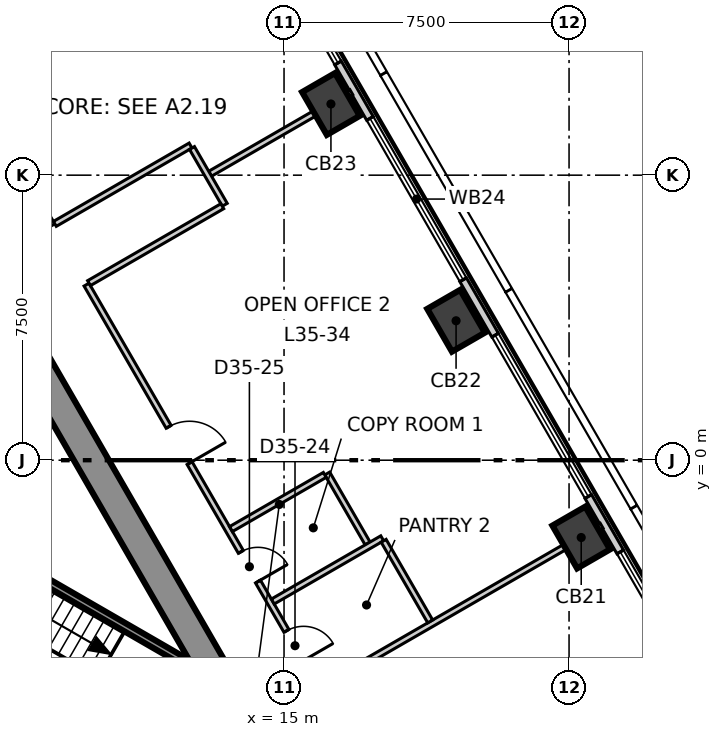
"""IFC4 building model, lengths in metres.
Left out: names, types, materials, properties, quantities, classifications, styles, units other than length and angle.
Written with IfcOpenShell. Run it as: python <this file> out.ifc"""

import sys

from ifc_helpers import new_model, si_unit, direction, frame, frame_2d, origin, origin_2d, place, context, subcontext, project, spatial, polyline, rectangle, outline, extrude, element, fill, save


model = new_model("IFC4")
c1 = context("Model", 3, precision=1e-05, world=origin(), true_north=direction((0.0, 1.0)))
c2 = subcontext(c1, "Body", "Model", "MODEL_VIEW")
j1 = project(units=[si_unit("LENGTHUNIT", "METRE"), si_unit("PLANEANGLEUNIT", "RADIAN")], contexts=[c1])
p1 = place(None, origin())
s1 = spatial("IfcSite", under=j1, at=p1, CompositionType="ELEMENT")
p2 = place(p1, origin())
s2 = spatial("IfcBuilding", under=s1, at=p2, CompositionType="ELEMENT")
p3 = place(p2, frame((0.0, 0.0, 152.3)))
s3 = spatial("IfcBuildingStorey", under=s2, at=p3, CompositionType="ELEMENT", Elevation=152.3)
p4 = place(p3, frame((13.221, -5.7, -0.3), z_axis=(0.0, 0.0, 1.0), x_axis=(-0.499995765644, 0.866027848477, 0.0)))
e1 = element("IfcWall", 1, at=p4, inside=s3, PredefinedType="SHEAR", context=c2, shape_type="SweptSolid", body=[
    extrude(outline(polyline([(-0.231, -0.4), (1.732, -0.4), (3.695, -0.4), (5.658, -0.4), (7.621, -0.4), (9.584, -0.4), (11.547, -0.4), (13.51, -0.4), (15.473, -0.4), (17.436, -0.4), (19.399, -0.4), (21.362, -0.4), (23.325, -0.4), (22.863, 0.4), (20.977, 0.4), (19.091, 0.4), (17.205, 0.4), (15.319, 0.4), (13.433, 0.4), (11.547, 0.4), (9.661, 0.4), (7.775, 0.4), (5.889, 0.4), (4.003, 0.4), (2.117, 0.4), (0.231, 0.4), (-0.231, -0.4)])), origin(), (0.0, 0.0, 1.0), 4.0),
])
p5 = place(p4, frame((10.647, 0.0, 0.3)))
e2 = element("IfcOpeningElement", 2, at=p5, cuts=e1, PredefinedType="OPENING", context=c2, shape_type="SweptSolid", body=[
    extrude(rectangle(XDim=1.8, YDim=2.1, at=frame_2d((0.9, 1.05))), frame((0.0, 0.41, 0.0), z_axis=(0.0, -1.0, 0.0), x_axis=(1.0, 0.0, 0.0)), (0.0, 0.0, 1.0), 0.82),
])
for number, where, z_axis, x_axis in (
    (3, (22.82, -2.034, -0.3), (0.0, 0.0, 1.0), (-0.5, 0.866, 0.0)),
    (4, (19.527, 3.669, -0.3), (0.0, 0.0, 1.0), (-0.5, 0.866, 0.0)),
    (5, (16.234, 9.373, -0.3), (0.0, 0.0, 1.0), (-0.5, 0.866, 0.0)),
):
    element("IfcColumn", number, at=place(p3, frame(where, z_axis=z_axis, x_axis=x_axis)), inside=s3, PredefinedType="COLUMN", context=c2, shape_type="SweptSolid", body=[
        extrude(rectangle(XDim=1.3, YDim=1.0, at=origin_2d()), origin(), (0.0, 0.0, 1.0), 4.0),
    ])
p6 = place(p3, frame((30.664, -14.22, 0.0), z_axis=(0.0, 0.0, 1.0), x_axis=(-0.499984613623, 0.866034286931, 0.0)))
e6 = element("IfcWall", 6, at=p6, inside=s3, PredefinedType="ELEMENTEDWALL", context=c2, shape_type="SweptSolid", body=[
    extrude(rectangle(XDim=55.274, YDim=0.2, at=frame_2d((27.637, 0.0))), origin(), (0.0, 0.0, 1.0), 3.7),
])
p7 = place(p6, frame((2.146, 0.0, 0.9)))
e7 = element("IfcOpeningElement", 7, at=p7, cuts=e6, PredefinedType="OPENING", context=c2, shape_type="SweptSolid", body=[
    extrude(rectangle(XDim=4.9, YDim=2.5, at=frame_2d((2.45, 1.25))), frame((0.0, 0.11, 0.0), z_axis=(0.0, -1.0, 0.0), x_axis=(1.0, 0.0, 0.0)), (0.0, 0.0, 1.0), 0.22),
])
p8 = place(p6, frame((8.732, 0.0, 0.9)))
e8 = element("IfcOpeningElement", 8, at=p8, cuts=e6, PredefinedType="OPENING", context=c2, shape_type="SweptSolid", body=[
    extrude(rectangle(XDim=4.9, YDim=2.5, at=frame_2d((2.45, 1.25))), frame((0.0, 0.11, 0.0), z_axis=(0.0, -1.0, 0.0), x_axis=(1.0, 0.0, 0.0)), (0.0, 0.0, 1.0), 0.22),
])
p9 = place(p6, frame((15.318, 0.0, 0.9)))
e9 = element("IfcOpeningElement", 9, at=p9, cuts=e6, PredefinedType="OPENING", context=c2, shape_type="SweptSolid", body=[
    extrude(rectangle(XDim=4.9, YDim=2.5, at=frame_2d((2.45, 1.25))), frame((0.0, 0.11, 0.0), z_axis=(0.0, -1.0, 0.0), x_axis=(1.0, 0.0, 0.0)), (0.0, 0.0, 1.0), 0.22),
])
p10 = place(p6, frame((21.904, 0.0, 0.9)))
e10 = element("IfcOpeningElement", 10, at=p10, cuts=e6, PredefinedType="OPENING", context=c2, shape_type="SweptSolid", body=[
    extrude(rectangle(XDim=4.9, YDim=2.5, at=frame_2d((2.45, 1.25))), frame((0.0, 0.11, 0.0), z_axis=(0.0, -1.0, 0.0), x_axis=(1.0, 0.0, 0.0)), (0.0, 0.0, 1.0), 0.22),
])
p11 = place(p6, frame((28.49, 0.0, 0.9)))
e11 = element("IfcOpeningElement", 11, at=p11, cuts=e6, PredefinedType="OPENING", context=c2, shape_type="SweptSolid", body=[
    extrude(rectangle(XDim=4.9, YDim=2.5, at=frame_2d((2.45, 1.25))), frame((0.0, 0.11, 0.0), z_axis=(0.0, -1.0, 0.0), x_axis=(1.0, 0.0, 0.0)), (0.0, 0.0, 1.0), 0.22),
])
p12 = place(p6, frame((35.076, 0.0, 0.9)))
e12 = element("IfcOpeningElement", 12, at=p12, cuts=e6, PredefinedType="OPENING", context=c2, shape_type="SweptSolid", body=[
    extrude(rectangle(XDim=4.9, YDim=2.5, at=frame_2d((2.45, 1.25))), frame((0.0, 0.11, 0.0), z_axis=(0.0, -1.0, 0.0), x_axis=(1.0, 0.0, 0.0)), (0.0, 0.0, 1.0), 0.22),
])
p13 = place(p6, frame((41.662, 0.0, 0.9)))
e13 = element("IfcOpeningElement", 13, at=p13, cuts=e6, PredefinedType="OPENING", context=c2, shape_type="SweptSolid", body=[
    extrude(rectangle(XDim=4.9, YDim=2.5, at=frame_2d((2.45, 1.25))), frame((0.0, 0.11, 0.0), z_axis=(0.0, -1.0, 0.0), x_axis=(1.0, 0.0, 0.0)), (0.0, 0.0, 1.0), 0.22),
])
p14 = place(p6, frame((48.248, 0.0, 0.9)))
e14 = element("IfcOpeningElement", 14, at=p14, cuts=e6, PredefinedType="OPENING", context=c2, shape_type="SweptSolid", body=[
    extrude(rectangle(XDim=4.9, YDim=2.5, at=frame_2d((2.45, 1.25))), frame((0.0, 0.11, 0.0), z_axis=(0.0, -1.0, 0.0), x_axis=(1.0, 0.0, 0.0)), (0.0, 0.0, 1.0), 0.22),
])
p15 = place(p3, frame((13.055, 7.538, 0.0), z_axis=(0.0, 0.0, 1.0), x_axis=(0.866070942811, 0.499921115796, 0.0)))
e15 = element("IfcWall", 15, at=p15, inside=s3, PredefinedType="PARTITIONING", context=c2, shape_type="SweptSolid", body=[
    extrude(rectangle(XDim=4.291, YDim=0.15, at=frame_2d((2.146, 0.0))), origin(), (0.0, 0.0, 1.0), 3.2),
])
p16 = place(p3, frame((0.076, 21.468, 0.0), z_axis=(0.0, 0.0, 1.0), x_axis=(0.500006592492, -0.866021597574, 0.0)))
e16 = element("IfcWall", 16, at=p16, inside=s3, PredefinedType="PARTITIONING", context=c2, shape_type="SweptSolid", body=[
    extrude(rectangle(XDim=17.652, YDim=0.15, at=frame_2d((8.826, 0.0))), origin(), (0.0, 0.0, 1.0), 3.7),
])
p17 = place(p16, frame((8.204, 0.0, 0.0)))
e17 = element("IfcOpeningElement", 17, at=p17, cuts=e16, PredefinedType="OPENING", context=c2, shape_type="SweptSolid", body=[
    extrude(rectangle(XDim=1.1, YDim=2.1, at=frame_2d((0.55, 1.05))), frame((0.0, 0.085, 0.0), z_axis=(0.0, -1.0, 0.0), x_axis=(1.0, 0.0, 0.0)), (0.0, 0.0, 1.0), 0.17),
])
p18 = place(p3, frame((9.803, 4.62, 0.0), z_axis=(0.0, 0.0, 1.0), x_axis=(0.500017706633, -0.866015180614, 0.0)))
e18 = element("IfcWall", 18, at=p18, inside=s3, PredefinedType="PARTITIONING", context=c2, shape_type="SweptSolid", body=[
    extrude(rectangle(XDim=17.656, YDim=0.15, at=frame_2d((8.828, 0.0))), origin(), (0.0, 0.0, 1.0), 3.7),
])
p19 = place(p18, frame((14.456, 0.0, 0.0)))
e19 = element("IfcOpeningElement", 19, at=p19, cuts=e18, PredefinedType="OPENING", context=c2, shape_type="SweptSolid", body=[
    extrude(rectangle(XDim=1.1, YDim=2.1, at=frame_2d((0.55, 1.05))), frame((0.0, 0.085, 0.0), z_axis=(0.0, -1.0, 0.0), x_axis=(1.0, 0.0, 0.0)), (0.0, 0.0, 1.0), 0.17),
])
p20 = place(p18, frame((4.321, 0.0, 0.0)))
e20 = element("IfcOpeningElement", 20, at=p20, cuts=e18, PredefinedType="OPENING", context=c2, shape_type="SweptSolid", body=[
    extrude(rectangle(XDim=1.1, YDim=2.1, at=frame_2d((0.55, 1.05))), frame((0.0, 0.085, 0.0), z_axis=(0.0, -1.0, 0.0), x_axis=(1.0, 0.0, 0.0)), (0.0, 0.0, 1.0), 0.17),
])
p21 = place(p18, frame((10.521, 0.0, 0.0)))
e21 = element("IfcOpeningElement", 21, at=p21, cuts=e18, PredefinedType="OPENING", context=c2, shape_type="SweptSolid", body=[
    extrude(rectangle(XDim=0.9, YDim=2.1, at=frame_2d((0.45, 1.05))), frame((0.0, 0.085, 0.0), z_axis=(0.0, -1.0, 0.0), x_axis=(1.0, 0.0, 0.0)), (0.0, 0.0, 1.0), 0.17),
])
p22 = place(p18, frame((8.121, 0.0, 0.0)))
e22 = element("IfcOpeningElement", 22, at=p22, cuts=e18, PredefinedType="OPENING", context=c2, shape_type="SweptSolid", body=[
    extrude(rectangle(XDim=0.9, YDim=2.1, at=frame_2d((0.45, 1.05))), frame((0.0, 0.085, 0.0), z_axis=(0.0, -1.0, 0.0), x_axis=(1.0, 0.0, 0.0)), (0.0, 0.0, 1.0), 0.17),
])
p23 = place(p3, frame((8.969, 6.218, 0.0), z_axis=(0.0, 0.0, 1.0), x_axis=(0.865997263264, 0.500048737644, 0.0)))
e23 = element("IfcWall", 23, at=p23, inside=s3, PredefinedType="PARTITIONING", context=c2, shape_type="SweptSolid", body=[
    extrude(rectangle(XDim=4.124, YDim=0.15, at=frame_2d((2.062, 0.0))), origin(), (0.0, 0.0, 1.0), 3.7),
])
p24 = place(p3, frame((12.578, 8.215, 0.0), z_axis=(0.0, 0.0, 1.0), x_axis=(0.499746958151, -0.866171448282, 0.0)))
e24 = element("IfcWall", 24, at=p24, inside=s3, PredefinedType="PARTITIONING", context=c2, shape_type="SweptSolid", body=[
    extrude(rectangle(XDim=1.725, YDim=0.15, at=frame_2d((0.863, 0.0))), origin(), (0.0, 0.0, 1.0), 3.7),
])
p25 = place(p3, frame((9.869, 4.659, 0.0), z_axis=(0.0, 0.0, 1.0), x_axis=(0.866033948129, 0.499985200469, 0.0)))
e25 = element("IfcWall", 25, at=p25, inside=s3, PredefinedType="PARTITIONING", context=c2, shape_type="SweptSolid", body=[
    extrude(rectangle(XDim=4.048, YDim=0.15, at=frame_2d((2.024, 0.0))), origin(), (0.0, 0.0, 1.0), 3.7),
])
p26 = place(p3, frame((16.137, -0.35, 0.0), z_axis=(0.0, 0.0, 1.0), x_axis=(0.499921421619, -0.866070766281, 0.0)))
e26 = element("IfcWall", 26, at=p26, inside=s3, PredefinedType="PARTITIONING", context=c2, shape_type="SweptSolid", body=[
    extrude(rectangle(XDim=2.124, YDim=0.15, at=frame_2d((1.062, 0.0))), origin(), (0.0, 0.0, 1.0), 3.7),
])
p27 = place(p3, frame((13.604, -1.812, 0.0), z_axis=(0.0, 0.0, 1.0), x_axis=(0.866004402611, 0.500036373335, 0.0)))
e27 = element("IfcWall", 27, at=p27, inside=s3, PredefinedType="PARTITIONING", context=c2, shape_type="SweptSolid", body=[
    extrude(rectangle(XDim=2.85, YDim=0.15, at=frame_2d((1.425, 0.0))), origin(), (0.0, 0.0, 1.0), 3.7),
])
p28 = place(p3, frame((14.704, -3.718, 0.0), z_axis=(0.0, 0.0, 1.0), x_axis=(0.865901827335, 0.500213979631, 0.0)))
e28 = element("IfcWall", 28, at=p28, inside=s3, PredefinedType="PARTITIONING", context=c2, shape_type="SweptSolid", body=[
    extrude(rectangle(XDim=3.325, YDim=0.15, at=frame_2d((1.662, 0.0))), origin(), (0.0, 0.0, 1.0), 3.7),
])
p29 = place(p3, frame((16.004, -5.969, 0.0), z_axis=(0.0, 0.0, 1.0), x_axis=(0.866045766046, 0.49996472987, 0.0)))
e29 = element("IfcWall", 29, at=p29, inside=s3, PredefinedType="PARTITIONING", context=c2, shape_type="SweptSolid", body=[
    extrude(rectangle(XDim=8.49, YDim=0.15, at=frame_2d((4.245, 0.0))), origin(), (0.0, 0.0, 1.0), 3.7),
])
p30 = place(p3, frame((17.621, -2.12, 0.0), z_axis=(0.0, 0.0, 1.0), x_axis=(0.499943856944, -0.866057815567, 0.0)))
e30 = element("IfcWall", 30, at=p30, inside=s3, PredefinedType="PARTITIONING", context=c2, shape_type="SweptSolid", body=[
    extrude(rectangle(XDim=2.45, YDim=0.15, at=frame_2d((1.225, 0.0))), origin(), (0.0, 0.0, 1.0), 3.7),
])
p31 = place(p3, frame((4.929, -4.693, 0.0), z_axis=(0.0, 0.0, 1.0), x_axis=(0.866005769735, -0.50003400563, 0.0)))
e31 = element("IfcWall", 31, at=p31, inside=s3, PredefinedType="SOLIDWALL", context=c2, shape_type="SweptSolid", body=[
    extrude(rectangle(XDim=7.665, YDim=0.2, at=frame_2d((3.833, 0.0))), origin(), (0.0, 0.0, 1.0), 3.7),
])
p32 = place(p3, frame((6.529, -1.922, 0.0), z_axis=(0.0, 0.0, 1.0), x_axis=(0.866060938598, -0.499938446846, 0.0)))
e32 = element("IfcWall", 32, at=p32, inside=s3, PredefinedType="SOLIDWALL", context=c2, shape_type="SweptSolid", body=[
    extrude(rectangle(XDim=7.665, YDim=0.2, at=frame_2d((3.832, 0.0))), origin(), (0.0, 0.0, 1.0), 3.7),
])
p33 = place(p8, origin())
e33 = element("IfcWindow", 33, at=p33, inside=s3, PartitioningType="SINGLE_PANEL", PredefinedType="WINDOW", context=c2, shape_type="SweptSolid", body=[
    extrude(rectangle(XDim=4.9, YDim=2.5, at=frame_2d((2.45, 1.25))), frame((0.0, 0.03, 0.0), z_axis=(0.0, -1.0, 0.0), x_axis=(1.0, 0.0, 0.0)), (0.0, 0.0, 1.0), 0.06),
])
fill(e8, e33)
p34 = place(p9, origin())
e34 = element("IfcWindow", 34, at=p34, inside=s3, PartitioningType="SINGLE_PANEL", PredefinedType="WINDOW", context=c2, shape_type="SweptSolid", body=[
    extrude(rectangle(XDim=4.9, YDim=2.5, at=frame_2d((2.45, 1.25))), frame((0.0, 0.03, 0.0), z_axis=(0.0, -1.0, 0.0), x_axis=(1.0, 0.0, 0.0)), (0.0, 0.0, 1.0), 0.06),
])
fill(e9, e34)
p35 = place(p10, origin())
e35 = element("IfcWindow", 35, at=p35, inside=s3, PartitioningType="SINGLE_PANEL", PredefinedType="WINDOW", context=c2, shape_type="SweptSolid", body=[
    extrude(rectangle(XDim=4.9, YDim=2.5, at=frame_2d((2.45, 1.25))), frame((0.0, 0.03, 0.0), z_axis=(0.0, -1.0, 0.0), x_axis=(1.0, 0.0, 0.0)), (0.0, 0.0, 1.0), 0.06),
])
fill(e10, e35)
p36 = place(p11, origin())
e36 = element("IfcWindow", 36, at=p36, inside=s3, PartitioningType="SINGLE_PANEL", PredefinedType="WINDOW", context=c2, shape_type="SweptSolid", body=[
    extrude(rectangle(XDim=4.9, YDim=2.5, at=frame_2d((2.45, 1.25))), frame((0.0, 0.03, 0.0), z_axis=(0.0, -1.0, 0.0), x_axis=(1.0, 0.0, 0.0)), (0.0, 0.0, 1.0), 0.06),
])
fill(e11, e36)
p37 = place(p20, origin())
e37 = element("IfcDoor", 37, at=p37, inside=s3, OperationType="SINGLE_SWING_LEFT", PredefinedType="DOOR", context=c2, shape_type="SweptSolid", body=[
    extrude(rectangle(XDim=1.1, YDim=2.1, at=frame_2d((0.55, 1.05))), frame((0.0, 0.025, 0.0), z_axis=(0.0, -1.0, 0.0), x_axis=(1.0, 0.0, 0.0)), (0.0, 0.0, 1.0), 0.05),
])
fill(e20, e37)
p38 = place(p21, origin())
e38 = element("IfcDoor", 38, at=p38, inside=s3, OperationType="SINGLE_SWING_LEFT", PredefinedType="DOOR", context=c2, shape_type="SweptSolid", body=[
    extrude(rectangle(XDim=0.9, YDim=2.1, at=frame_2d((0.45, 1.05))), frame((0.0, 0.025, 0.0), z_axis=(0.0, -1.0, 0.0), x_axis=(1.0, 0.0, 0.0)), (0.0, 0.0, 1.0), 0.05),
])
fill(e21, e38)
p39 = place(p22, origin())
e39 = element("IfcDoor", 39, at=p39, inside=s3, OperationType="SINGLE_SWING_LEFT", PredefinedType="DOOR", context=c2, shape_type="SweptSolid", body=[
    extrude(rectangle(XDim=0.9, YDim=2.1, at=frame_2d((0.45, 1.05))), frame((0.0, 0.025, 0.0), z_axis=(0.0, -1.0, 0.0), x_axis=(1.0, 0.0, 0.0)), (0.0, 0.0, 1.0), 0.05),
])
fill(e22, e39)
save(model, sys.argv[1])
